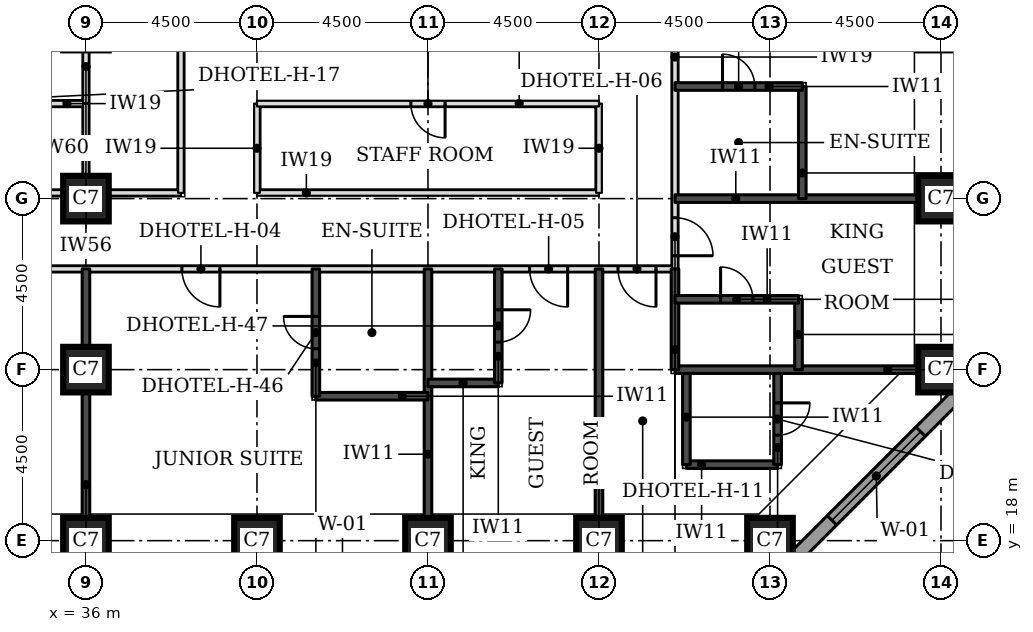
"""IFC4 building model, lengths in metres.
Left out: names, types, materials, properties, quantities, classifications, styles, units other than length and angle.
Written with IfcOpenShell. Run it as: python <this file> out.ifc"""

import sys

from ifc_helpers import new_model, si_unit, direction, frame, frame_2d, origin, origin_2d, place, context, subcontext, project, spatial, rectangle, extrude, element, fill, save


model = new_model("IFC4")
c1 = context("Model", 3, precision=1e-05, world=origin(), true_north=direction((0.0, 1.0)))
c2 = subcontext(c1, "Body", "Model", "MODEL_VIEW")
j1 = project(units=[si_unit("LENGTHUNIT", "METRE"), si_unit("PLANEANGLEUNIT", "RADIAN")], contexts=[c1])
p1 = place(None, origin())
s1 = spatial("IfcSite", under=j1, at=p1, CompositionType="ELEMENT")
p2 = place(p1, origin())
s2 = spatial("IfcBuilding", under=s1, at=p2, CompositionType="ELEMENT")
p3 = place(p2, frame((0.0, 0.0, 46.2)))
s3 = spatial("IfcBuildingStorey", under=s2, at=p3, CompositionType="ELEMENT", Elevation=46.2)
for number, where, z_axis, x_axis in (
    (1, (36.0, 18.0, 0.0), (0.0, 0.0, 1.0), (1.0, 0.0, 0.0)),
    (2, (40.5, 18.0, 0.0), (0.0, 0.0, 1.0), (1.0, 0.0, 0.0)),
    (3, (45.0, 18.0, 0.0), (0.0, 0.0, 1.0), (1.0, 0.0, 0.0)),
    (4, (49.5, 18.0, 0.0), (0.0, 0.0, 1.0), (1.0, 0.0, 0.0)),
    (5, (54.0, 18.0, 0.0), (0.0, 0.0, 1.0), (1.0, 0.0, 0.0)),
    (6, (36.0, 22.5, 0.0), (0.0, 0.0, 1.0), (1.0, 0.0, 0.0)),
    (7, (58.5, 22.5, 0.0), (0.0, 0.0, 1.0), (1.0, 0.0, 0.0)),
    (8, (36.0, 27.0, 0.0), (0.0, 0.0, 1.0), (1.0, 0.0, 0.0)),
    (9, (58.5, 27.0, 0.0), (0.0, 0.0, 1.0), (1.0, 0.0, 0.0)),
):
    element("IfcColumn", number, at=place(p3, frame(where, z_axis=z_axis, x_axis=x_axis)), inside=s3, PredefinedType="COLUMN", context=c2, shape_type="SweptSolid", body=[
        extrude(rectangle(XDim=1.2, YDim=1.2, at=origin_2d()), origin(), (0.0, 0.0, 1.0), 3.3),
    ])
p4 = place(p3, frame((54.27, 17.174, 0.0), z_axis=(0.0, 0.0, 1.0), x_axis=(0.707106781187, 0.707106781187, 0.0)))
e10 = element("IfcWall", 10, at=p4, inside=s3, PredefinedType="STANDARD", context=c2, shape_type="SweptSolid", body=[
    extrude(rectangle(XDim=7.151, YDim=0.35, at=frame_2d((3.576, 0.0))), origin(), (0.0, 0.0, 1.0), 3.055),
])
p5 = place(p4, frame((1.926, 0.0, 0.8)))
e11 = element("IfcOpeningElement", 11, at=p5, cuts=e10, PredefinedType="OPENING", context=c2, shape_type="SweptSolid", body=[
    extrude(rectangle(XDim=3.3, YDim=1.5, at=frame_2d((1.65, 0.75))), frame((0.0, 0.185, 0.0), z_axis=(0.0, -1.0, 0.0), x_axis=(1.0, 0.0, 0.0)), (0.0, 0.0, 1.0), 0.37),
])
p6 = place(p3, frame((20.65, 25.15, 0.0), z_axis=(0.0, 0.0, 1.0), x_axis=(1.0, 0.0, 0.0)))
e12 = element("IfcWall", 12, at=p6, inside=s3, PredefinedType="PARTITIONING", context=c2, shape_type="SweptSolid", body=[
    extrude(rectangle(XDim=30.85, YDim=0.15, at=frame_2d((15.425, 0.0))), origin(), (0.0, 0.0, 1.0), 3.08),
])
p7 = place(p6, frame((2.425, 0.0, 0.0)))
e13 = element("IfcOpeningElement", 13, at=p7, cuts=e12, PredefinedType="OPENING", context=c2, shape_type="SweptSolid", body=[
    extrude(rectangle(XDim=1.0, YDim=2.1, at=frame_2d((0.5, 1.05))), frame((0.0, 0.085, 0.0), z_axis=(0.0, -1.0, 0.0), x_axis=(1.0, 0.0, 0.0)), (0.0, 0.0, 1.0), 0.17),
])
p8 = place(p6, frame((11.575, 0.0, 0.0)))
e14 = element("IfcOpeningElement", 14, at=p8, cuts=e12, PredefinedType="OPENING", context=c2, shape_type="SweptSolid", body=[
    extrude(rectangle(XDim=1.0, YDim=2.1, at=frame_2d((0.5, 1.05))), frame((0.0, 0.085, 0.0), z_axis=(0.0, -1.0, 0.0), x_axis=(1.0, 0.0, 0.0)), (0.0, 0.0, 1.0), 0.17),
])
p9 = place(p6, frame((17.875, 0.0, 0.0)))
e15 = element("IfcOpeningElement", 15, at=p9, cuts=e12, PredefinedType="OPENING", context=c2, shape_type="SweptSolid", body=[
    extrude(rectangle(XDim=1.0, YDim=2.1, at=frame_2d((0.5, 1.05))), frame((0.0, 0.085, 0.0), z_axis=(0.0, -1.0, 0.0), x_axis=(1.0, 0.0, 0.0)), (0.0, 0.0, 1.0), 0.17),
])
p10 = place(p6, frame((27.025, 0.0, 0.0)))
e16 = element("IfcOpeningElement", 16, at=p10, cuts=e12, PredefinedType="OPENING", context=c2, shape_type="SweptSolid", body=[
    extrude(rectangle(XDim=1.0, YDim=2.1, at=frame_2d((0.5, 1.05))), frame((0.0, 0.085, 0.0), z_axis=(0.0, -1.0, 0.0), x_axis=(1.0, 0.0, 0.0)), (0.0, 0.0, 1.0), 0.17),
])
p11 = place(p6, frame((0.425, 0.0, 0.0)))
e17 = element("IfcOpeningElement", 17, at=p11, cuts=e12, PredefinedType="OPENING", context=c2, shape_type="SweptSolid", body=[
    extrude(rectangle(XDim=1.0, YDim=2.1, at=frame_2d((0.5, 1.05))), frame((0.0, 0.085, 0.0), z_axis=(0.0, -1.0, 0.0), x_axis=(1.0, 0.0, 0.0)), (0.0, 0.0, 1.0), 0.17),
])
p12 = place(p6, frame((29.35, 0.0, 0.0)))
e18 = element("IfcOpeningElement", 18, at=p12, cuts=e12, PredefinedType="OPENING", context=c2, shape_type="SweptSolid", body=[
    extrude(rectangle(XDim=1.0, YDim=2.1, at=frame_2d((0.5, 1.05))), frame((0.0, 0.085, 0.0), z_axis=(0.0, -1.0, 0.0), x_axis=(1.0, 0.0, 0.0)), (0.0, 0.0, 1.0), 0.17),
])
p13 = place(p3, frame((51.5, 25.15, 0.0), z_axis=(0.0, 0.0, 1.0), x_axis=(0.0, 1.0, 0.0)))
e19 = element("IfcWall", 19, at=p13, inside=s3, PredefinedType="PARTITIONING", context=c2, shape_type="SweptSolid", body=[
    extrude(rectangle(XDim=22.35, YDim=0.15, at=frame_2d((11.175, 0.0))), origin(), (0.0, 0.0, 1.0), 3.08),
])
p14 = place(p13, frame((0.347, 0.0, 0.0)))
e20 = element("IfcOpeningElement", 20, at=p14, cuts=e19, PredefinedType="OPENING", context=c2, shape_type="SweptSolid", body=[
    extrude(rectangle(XDim=1.0, YDim=2.1, at=frame_2d((0.5, 1.05))), frame((0.0, 0.085, 0.0), z_axis=(0.0, -1.0, 0.0), x_axis=(1.0, 0.0, 0.0)), (0.0, 0.0, 1.0), 0.17),
])
p15 = place(p13, frame((7.325, 0.0, 0.0)))
e21 = element("IfcOpeningElement", 21, at=p15, cuts=e19, PredefinedType="OPENING", context=c2, shape_type="SweptSolid", body=[
    extrude(rectangle(XDim=1.0, YDim=2.1, at=frame_2d((0.5, 1.05))), frame((0.0, 0.085, 0.0), z_axis=(0.0, -1.0, 0.0), x_axis=(1.0, 0.0, 0.0)), (0.0, 0.0, 1.0), 0.17),
])
p16 = place(p13, frame((11.675, 0.0, 0.0)))
e22 = element("IfcOpeningElement", 22, at=p16, cuts=e19, PredefinedType="OPENING", context=c2, shape_type="SweptSolid", body=[
    extrude(rectangle(XDim=1.0, YDim=2.1, at=frame_2d((0.5, 1.05))), frame((0.0, 0.085, 0.0), z_axis=(0.0, -1.0, 0.0), x_axis=(1.0, 0.0, 0.0)), (0.0, 0.0, 1.0), 0.17),
])
p17 = place(p3, frame((27.0, 27.15, 0.0), z_axis=(0.0, 0.0, 1.0), x_axis=(1.0, 0.0, 0.0)))
e23 = element("IfcWall", 23, at=p17, inside=s3, PredefinedType="PARTITIONING", context=c2, shape_type="SweptSolid", body=[
    extrude(rectangle(XDim=11.5, YDim=0.15, at=frame_2d((5.75, 0.0))), origin(), (0.0, 0.0, 1.0), 3.08),
])
p18 = place(p3, frame((38.5, 27.15, 0.0), z_axis=(0.0, 0.0, 1.0), x_axis=(0.0, 1.0, 0.0)))
e24 = element("IfcWall", 24, at=p18, inside=s3, PredefinedType="PARTITIONING", context=c2, shape_type="SweptSolid", body=[
    extrude(rectangle(XDim=13.35, YDim=0.15, at=frame_2d((6.675, 0.0))), origin(), (0.0, 0.0, 1.0), 3.08),
])
p19 = place(p18, frame((6.225, 0.0, 0.0)))
e25 = element("IfcOpeningElement", 25, at=p19, cuts=e24, PredefinedType="OPENING", context=c2, shape_type="SweptSolid", body=[
    extrude(rectangle(XDim=0.9, YDim=2.1, at=frame_2d((0.45, 1.05))), frame((0.0, 0.085, 0.0), z_axis=(0.0, -1.0, 0.0), x_axis=(1.0, 0.0, 0.0)), (0.0, 0.0, 1.0), 0.17),
])
p20 = place(p3, frame((40.5, 27.15, 0.0), z_axis=(0.0, 0.0, 1.0), x_axis=(1.0, 0.0, 0.0)))
e26 = element("IfcWall", 26, at=p20, inside=s3, PredefinedType="PARTITIONING", context=c2, shape_type="SweptSolid", body=[
    extrude(rectangle(XDim=9.0, YDim=0.15, at=frame_2d((4.5, 0.0))), origin(), (0.0, 0.0, 1.0), 3.08),
])
for number, where, z_axis, x_axis in (
    (27, (40.5, 27.15, 0.0), (0.0, 0.0, 1.0), (0.0, 1.0, 0.0)),
    (28, (49.5, 27.15, 0.0), (0.0, 0.0, 1.0), (0.0, 1.0, 0.0)),
):
    element("IfcWall", number, at=place(p3, frame(where, z_axis=z_axis, x_axis=x_axis)), inside=s3, PredefinedType="PARTITIONING", context=c2, shape_type="SweptSolid", body=[
        extrude(rectangle(XDim=2.35, YDim=0.15, at=frame_2d((1.175, 0.0))), origin(), (0.0, 0.0, 1.0), 3.08),
    ])
p21 = place(p3, frame((27.0, 29.5, 0.0), z_axis=(0.0, 0.0, 1.0), x_axis=(1.0, 0.0, 0.0)))
e29 = element("IfcWall", 29, at=p21, inside=s3, PredefinedType="PARTITIONING", context=c2, shape_type="SweptSolid", body=[
    extrude(rectangle(XDim=9.0, YDim=0.15, at=frame_2d((4.5, 0.0))), origin(), (0.0, 0.0, 1.0), 3.08),
])
p22 = place(p21, frame((4.05, 0.0, 0.0)))
e30 = element("IfcOpeningElement", 30, at=p22, cuts=e29, PredefinedType="OPENING", context=c2, shape_type="SweptSolid", body=[
    extrude(rectangle(XDim=0.9, YDim=2.1, at=frame_2d((0.45, 1.05))), frame((0.0, 0.085, 0.0), z_axis=(0.0, -1.0, 0.0), x_axis=(1.0, 0.0, 0.0)), (0.0, 0.0, 1.0), 0.17),
])
p23 = place(p3, frame((36.0, 29.5, 0.0), z_axis=(0.0, 0.0, 1.0), x_axis=(0.0, 1.0, 0.0)))
e31 = element("IfcWall", 31, at=p23, inside=s3, PredefinedType="PARTITIONING", context=c2, shape_type="SweptSolid", body=[
    extrude(rectangle(XDim=1.95, YDim=0.15, at=frame_2d((0.975, 0.0))), origin(), (0.0, 0.0, 1.0), 2.33),
])
p24 = place(p3, frame((40.5, 29.5, 0.0), z_axis=(0.0, 0.0, 1.0), x_axis=(1.0, 0.0, 0.0)))
e32 = element("IfcWall", 32, at=p24, inside=s3, PredefinedType="PARTITIONING", context=c2, shape_type="SweptSolid", body=[
    extrude(rectangle(XDim=9.0, YDim=0.15, at=frame_2d((4.5, 0.0))), origin(), (0.0, 0.0, 1.0), 3.08),
])
p25 = place(p24, frame((4.05, 0.0, 0.0)))
e33 = element("IfcOpeningElement", 33, at=p25, cuts=e32, PredefinedType="OPENING", context=c2, shape_type="SweptSolid", body=[
    extrude(rectangle(XDim=0.9, YDim=2.1, at=frame_2d((0.45, 1.05))), frame((0.0, 0.085, 0.0), z_axis=(0.0, -1.0, 0.0), x_axis=(1.0, 0.0, 0.0)), (0.0, 0.0, 1.0), 0.17),
])
for number, where, z_axis, x_axis in (
    (34, (36.0, 18.6, 0.0), (0.0, 0.0, 1.0), (0.0, 1.0, 0.0)),
    (35, (45.0, 18.6, 0.0), (0.0, 0.0, 1.0), (0.0, 1.0, 0.0)),
    (36, (49.5, 18.6, 0.0), (0.0, 0.0, 1.0), (0.0, 1.0, 0.0)),
):
    element("IfcWall", number, at=place(p3, frame(where, z_axis=z_axis, x_axis=x_axis)), inside=s3, PredefinedType="SOLIDWALL", context=c2, shape_type="SweptSolid", body=[
        extrude(rectangle(XDim=6.55, YDim=0.2, at=frame_2d((3.275, 0.0))), origin(), (0.0, 0.0, 1.0), 3.08),
    ])
p26 = place(p3, frame((51.8, 20.0, 0.0), z_axis=(0.0, 0.0, 1.0), x_axis=(1.0, 0.0, 0.0)))
e37 = element("IfcWall", 37, at=p26, inside=s3, PredefinedType="SOLIDWALL", context=c2, shape_type="SweptSolid", body=[
    extrude(rectangle(XDim=2.4, YDim=0.2, at=frame_2d((1.2, 0.0))), origin(), (0.0, 0.0, 1.0), 3.08),
])
p27 = place(p3, frame((51.8, 20.0, 0.0), z_axis=(0.0, 0.0, 1.0), x_axis=(0.0, 1.0, 0.0)))
e38 = element("IfcWall", 38, at=p27, inside=s3, PredefinedType="SOLIDWALL", context=c2, shape_type="SweptSolid", body=[
    extrude(rectangle(XDim=2.5, YDim=0.2, at=frame_2d((1.25, 0.0))), origin(), (0.0, 0.0, 1.0), 3.08),
])
p28 = place(p3, frame((54.2, 20.0, 0.0), z_axis=(0.0, 0.0, 1.0), x_axis=(0.0, 1.0, 0.0)))
e39 = element("IfcWall", 39, at=p28, inside=s3, PredefinedType="SOLIDWALL", context=c2, shape_type="SweptSolid", body=[
    extrude(rectangle(XDim=2.5, YDim=0.2, at=frame_2d((1.25, 0.0))), origin(), (0.0, 0.0, 1.0), 3.08),
])
p29 = place(p28, frame((0.775, 0.0, 0.0)))
e40 = element("IfcOpeningElement", 40, at=p29, cuts=e39, PredefinedType="OPENING", context=c2, shape_type="SweptSolid", body=[
    extrude(rectangle(XDim=0.85, YDim=2.1, at=frame_2d((0.425, 1.05))), frame((0.0, 0.11, 0.0), z_axis=(0.0, -1.0, 0.0), x_axis=(1.0, 0.0, 0.0)), (0.0, 0.0, 1.0), 0.22),
])
p30 = place(p3, frame((42.05, 21.8, 0.0), z_axis=(0.0, 0.0, 1.0), x_axis=(1.0, 0.0, 0.0)))
e41 = element("IfcWall", 41, at=p30, inside=s3, PredefinedType="SOLIDWALL", context=c2, shape_type="SweptSolid", body=[
    extrude(rectangle(XDim=2.95, YDim=0.2, at=frame_2d((1.475, 0.0))), origin(), (0.0, 0.0, 1.0), 3.08),
])
p31 = place(p3, frame((42.05, 21.8, 0.0), z_axis=(0.0, 0.0, 1.0), x_axis=(0.0, 1.0, 0.0)))
e42 = element("IfcWall", 42, at=p31, inside=s3, PredefinedType="SOLIDWALL", context=c2, shape_type="SweptSolid", body=[
    extrude(rectangle(XDim=3.35, YDim=0.2, at=frame_2d((1.675, 0.0))), origin(), (0.0, 0.0, 1.0), 3.08),
])
p32 = place(p31, frame((1.25, 0.0, 0.0)))
e43 = element("IfcOpeningElement", 43, at=p32, cuts=e42, PredefinedType="OPENING", context=c2, shape_type="SweptSolid", body=[
    extrude(rectangle(XDim=0.85, YDim=2.1, at=frame_2d((0.425, 1.05))), frame((0.0, 0.11, 0.0), z_axis=(0.0, -1.0, 0.0), x_axis=(1.0, 0.0, 0.0)), (0.0, 0.0, 1.0), 0.22),
])
p33 = place(p3, frame((45.0, 22.15, 0.0), z_axis=(0.0, 0.0, 1.0), x_axis=(1.0, 0.0, 0.0)))
e44 = element("IfcWall", 44, at=p33, inside=s3, PredefinedType="SOLIDWALL", context=c2, shape_type="SweptSolid", body=[
    extrude(rectangle(XDim=1.85, YDim=0.2, at=frame_2d((0.925, 0.0))), origin(), (0.0, 0.0, 1.0), 3.08),
])
p34 = place(p3, frame((46.85, 22.15, 0.0), z_axis=(0.0, 0.0, 1.0), x_axis=(0.0, 1.0, 0.0)))
e45 = element("IfcWall", 45, at=p34, inside=s3, PredefinedType="SOLIDWALL", context=c2, shape_type="SweptSolid", body=[
    extrude(rectangle(XDim=3.0, YDim=0.2, at=frame_2d((1.5, 0.0))), origin(), (0.0, 0.0, 1.0), 3.08),
])
p35 = place(p34, frame((1.075, 0.0, 0.0)))
e46 = element("IfcOpeningElement", 46, at=p35, cuts=e45, PredefinedType="OPENING", context=c2, shape_type="SweptSolid", body=[
    extrude(rectangle(XDim=0.85, YDim=2.1, at=frame_2d((0.425, 1.05))), frame((0.0, 0.11, 0.0), z_axis=(0.0, -1.0, 0.0), x_axis=(1.0, 0.0, 0.0)), (0.0, 0.0, 1.0), 0.22),
])
p36 = place(p3, frame((51.5, 22.5, 0.0), z_axis=(0.0, 0.0, 1.0), x_axis=(1.0, 0.0, 0.0)))
e47 = element("IfcWall", 47, at=p36, inside=s3, PredefinedType="SOLIDWALL", context=c2, shape_type="SweptSolid", body=[
    extrude(rectangle(XDim=6.4, YDim=0.2, at=frame_2d((3.2, 0.0))), origin(), (0.0, 0.0, 1.0), 3.08),
])
p37 = place(p3, frame((51.5, 22.5, 0.0), z_axis=(0.0, 0.0, 1.0), x_axis=(0.0, 1.0, 0.0)))
e48 = element("IfcWall", 48, at=p37, inside=s3, PredefinedType="SOLIDWALL", context=c2, shape_type="SweptSolid", body=[
    extrude(rectangle(XDim=2.65, YDim=0.2, at=frame_2d((1.325, 0.0))), origin(), (0.0, 0.0, 1.0), 3.08),
])
p38 = place(p3, frame((54.75, 22.5, 0.0), z_axis=(0.0, 0.0, 1.0), x_axis=(0.0, 1.0, 0.0)))
e49 = element("IfcWall", 49, at=p38, inside=s3, PredefinedType="SOLIDWALL", context=c2, shape_type="SweptSolid", body=[
    extrude(rectangle(XDim=1.85, YDim=0.2, at=frame_2d((0.925, 0.0))), origin(), (0.0, 0.0, 1.0), 3.08),
])
p39 = place(p3, frame((51.5, 24.35, 0.0), z_axis=(0.0, 0.0, 1.0), x_axis=(1.0, 0.0, 0.0)))
e50 = element("IfcWall", 50, at=p39, inside=s3, PredefinedType="SOLIDWALL", context=c2, shape_type="SweptSolid", body=[
    extrude(rectangle(XDim=3.25, YDim=0.2, at=frame_2d((1.625, 0.0))), origin(), (0.0, 0.0, 1.0), 3.08),
])
p40 = place(p39, frame((1.2, 0.0, 0.0)))
e51 = element("IfcOpeningElement", 51, at=p40, cuts=e50, PredefinedType="OPENING", context=c2, shape_type="SweptSolid", body=[
    extrude(rectangle(XDim=0.85, YDim=2.1, at=frame_2d((0.425, 1.05))), frame((0.0, 0.11, 0.0), z_axis=(0.0, -1.0, 0.0), x_axis=(1.0, 0.0, 0.0)), (0.0, 0.0, 1.0), 0.22),
])
p41 = place(p3, frame((51.5, 27.0, 0.0), z_axis=(0.0, 0.0, 1.0), x_axis=(1.0, 0.0, 0.0)))
e52 = element("IfcWall", 52, at=p41, inside=s3, PredefinedType="SOLIDWALL", context=c2, shape_type="SweptSolid", body=[
    extrude(rectangle(XDim=6.4, YDim=0.2, at=frame_2d((3.2, 0.0))), origin(), (0.0, 0.0, 1.0), 3.08),
])
p42 = place(p3, frame((54.85, 27.0, 0.0), z_axis=(0.0, 0.0, 1.0), x_axis=(0.0, 1.0, 0.0)))
e53 = element("IfcWall", 53, at=p42, inside=s3, PredefinedType="SOLIDWALL", context=c2, shape_type="SweptSolid", body=[
    extrude(rectangle(XDim=2.95, YDim=0.2, at=frame_2d((1.475, 0.0))), origin(), (0.0, 0.0, 1.0), 3.08),
])
p43 = place(p3, frame((51.5, 29.95, 0.0), z_axis=(0.0, 0.0, 1.0), x_axis=(1.0, 0.0, 0.0)))
e54 = element("IfcWall", 54, at=p43, inside=s3, PredefinedType="SOLIDWALL", context=c2, shape_type="SweptSolid", body=[
    extrude(rectangle(XDim=3.35, YDim=0.2, at=frame_2d((1.675, 0.0))), origin(), (0.0, 0.0, 1.0), 3.08),
])
p44 = place(p43, frame((1.25, 0.0, 0.0)))
e55 = element("IfcOpeningElement", 55, at=p44, cuts=e54, PredefinedType="OPENING", context=c2, shape_type="SweptSolid", body=[
    extrude(rectangle(XDim=0.85, YDim=2.1, at=frame_2d((0.425, 1.05))), frame((0.0, 0.11, 0.0), z_axis=(0.0, -1.0, 0.0), x_axis=(1.0, 0.0, 0.0)), (0.0, 0.0, 1.0), 0.22),
])
p45 = place(p3, frame((36.0, 27.15, 0.0), z_axis=(0.0, 0.0, 1.0), x_axis=(0.0, 1.0, 0.0)))
e56 = element("IfcWall", 56, at=p45, inside=s3, PredefinedType="PARTITIONING", context=c2, shape_type="SweptSolid", body=[
    extrude(rectangle(XDim=2.35, YDim=0.15, at=frame_2d((1.175, 0.0))), origin(), (0.0, 0.0, 1.0), 2.33),
])
p46 = place(p5, origin())
e57 = element("IfcWindow", 57, at=p46, inside=s3, PartitioningType="SINGLE_PANEL", PredefinedType="WINDOW", context=c2, shape_type="SweptSolid", body=[
    extrude(rectangle(XDim=3.3, YDim=1.5, at=frame_2d((1.65, 0.75))), frame((0.0, 0.085, 0.0), z_axis=(0.0, -1.0, 0.0), x_axis=(1.0, 0.0, 0.0)), (0.0, 0.0, 1.0), 0.06),
])
fill(e11, e57)
p47 = place(p9, frame((1.0, 0.0, 0.0), z_axis=(0.0, 0.0, 1.0), x_axis=(-1.0, 0.0, 0.0)))
e58 = element("IfcDoor", 58, at=p47, inside=s3, OperationType="SINGLE_SWING_LEFT", PredefinedType="DOOR", context=c2, shape_type="SweptSolid", body=[
    extrude(rectangle(XDim=1.0, YDim=2.1, at=frame_2d((0.5, 1.05))), frame((0.0, 0.025, 0.0), z_axis=(0.0, -1.0, 0.0), x_axis=(1.0, 0.0, 0.0)), (0.0, 0.0, 1.0), 0.05),
])
fill(e15, e58)
p48 = place(p32, origin())
e59 = element("IfcDoor", 59, at=p48, inside=s3, OperationType="SINGLE_SWING_RIGHT", PredefinedType="DOOR", context=c2, shape_type="SweptSolid", body=[
    extrude(rectangle(XDim=0.85, YDim=2.1, at=frame_2d((0.425, 1.05))), frame((0.0, 0.025, 0.0), z_axis=(0.0, -1.0, 0.0), x_axis=(1.0, 0.0, 0.0)), (0.0, 0.0, 1.0), 0.05),
])
fill(e43, e59)
p49 = place(p10, frame((1.0, 0.0, 0.0), z_axis=(0.0, 0.0, 1.0), x_axis=(-1.0, 0.0, 0.0)))
e60 = element("IfcDoor", 60, at=p49, inside=s3, OperationType="SINGLE_SWING_LEFT", PredefinedType="DOOR", context=c2, shape_type="SweptSolid", body=[
    extrude(rectangle(XDim=1.0, YDim=2.1, at=frame_2d((0.5, 1.05))), frame((0.0, 0.025, 0.0), z_axis=(0.0, -1.0, 0.0), x_axis=(1.0, 0.0, 0.0)), (0.0, 0.0, 1.0), 0.05),
])
fill(e16, e60)
p50 = place(p35, frame((0.85, 0.0, 0.0), z_axis=(0.0, 0.0, 1.0), x_axis=(-1.0, 0.0, 0.0)))
e61 = element("IfcDoor", 61, at=p50, inside=s3, OperationType="SINGLE_SWING_LEFT", PredefinedType="DOOR", context=c2, shape_type="SweptSolid", body=[
    extrude(rectangle(XDim=0.85, YDim=2.1, at=frame_2d((0.425, 1.05))), frame((0.0, 0.025, 0.0), z_axis=(0.0, -1.0, 0.0), x_axis=(1.0, 0.0, 0.0)), (0.0, 0.0, 1.0), 0.05),
])
fill(e46, e61)
p51 = place(p14, frame((1.0, 0.0, 0.0), z_axis=(0.0, 0.0, 1.0), x_axis=(-1.0, 0.0, 0.0)))
e62 = element("IfcDoor", 62, at=p51, inside=s3, OperationType="SINGLE_SWING_RIGHT", PredefinedType="DOOR", context=c2, shape_type="SweptSolid", body=[
    extrude(rectangle(XDim=1.0, YDim=2.1, at=frame_2d((0.5, 1.05))), frame((0.0, 0.025, 0.0), z_axis=(0.0, -1.0, 0.0), x_axis=(1.0, 0.0, 0.0)), (0.0, 0.0, 1.0), 0.05),
])
fill(e20, e62)
p52 = place(p40, origin())
e63 = element("IfcDoor", 63, at=p52, inside=s3, OperationType="SINGLE_SWING_LEFT", PredefinedType="DOOR", context=c2, shape_type="SweptSolid", body=[
    extrude(rectangle(XDim=0.85, YDim=2.1, at=frame_2d((0.425, 1.05))), frame((0.0, 0.025, 0.0), z_axis=(0.0, -1.0, 0.0), x_axis=(1.0, 0.0, 0.0)), (0.0, 0.0, 1.0), 0.05),
])
fill(e51, e63)
p53 = place(p44, origin())
e64 = element("IfcDoor", 64, at=p53, inside=s3, OperationType="SINGLE_SWING_LEFT", PredefinedType="DOOR", context=c2, shape_type="SweptSolid", body=[
    extrude(rectangle(XDim=0.85, YDim=2.1, at=frame_2d((0.425, 1.05))), frame((0.0, 0.025, 0.0), z_axis=(0.0, -1.0, 0.0), x_axis=(1.0, 0.0, 0.0)), (0.0, 0.0, 1.0), 0.05),
])
fill(e55, e64)
p54 = place(p12, frame((1.0, 0.0, 0.0), z_axis=(0.0, 0.0, 1.0), x_axis=(-1.0, 0.0, 0.0)))
e65 = element("IfcDoor", 65, at=p54, inside=s3, OperationType="SINGLE_SWING_LEFT", PredefinedType="DOOR", context=c2, shape_type="SweptSolid", body=[
    extrude(rectangle(XDim=1.0, YDim=2.1, at=frame_2d((0.5, 1.05))), frame((0.0, 0.025, 0.0), z_axis=(0.0, -1.0, 0.0), x_axis=(1.0, 0.0, 0.0)), (0.0, 0.0, 1.0), 0.05),
])
fill(e18, e65)
p55 = place(p29, frame((0.85, 0.0, 0.0), z_axis=(0.0, 0.0, 1.0), x_axis=(-1.0, 0.0, 0.0)))
e66 = element("IfcDoor", 66, at=p55, inside=s3, OperationType="SINGLE_SWING_LEFT", PredefinedType="DOOR", context=c2, shape_type="SweptSolid", body=[
    extrude(rectangle(XDim=0.85, YDim=2.1, at=frame_2d((0.425, 1.05))), frame((0.0, 0.025, 0.0), z_axis=(0.0, -1.0, 0.0), x_axis=(1.0, 0.0, 0.0)), (0.0, 0.0, 1.0), 0.05),
])
fill(e40, e66)
p56 = place(p25, frame((0.9, 0.0, 0.0), z_axis=(0.0, 0.0, 1.0), x_axis=(-1.0, 0.0, 0.0)))
e67 = element("IfcDoor", 67, at=p56, inside=s3, OperationType="SINGLE_SWING_LEFT", PredefinedType="DOOR", context=c2, shape_type="SweptSolid", body=[
    extrude(rectangle(XDim=0.9, YDim=2.1, at=frame_2d((0.45, 1.05))), frame((0.0, 0.025, 0.0), z_axis=(0.0, -1.0, 0.0), x_axis=(1.0, 0.0, 0.0)), (0.0, 0.0, 1.0), 0.05),
])
fill(e33, e67)
save(model, sys.argv[1])
